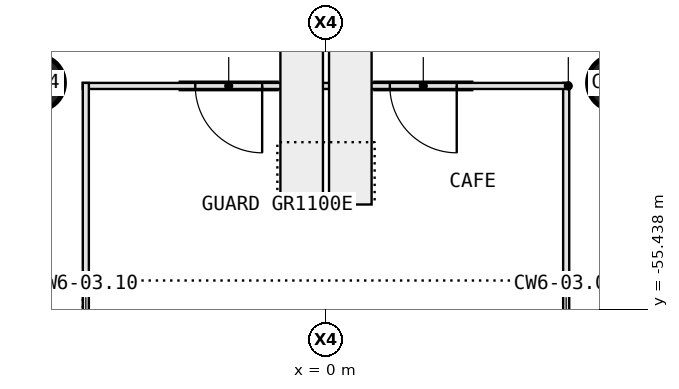
"""IFC4 building model, lengths in metres.
Left out: names, types, materials, properties, quantities, classifications, styles, units other than length and angle.
Written with IfcOpenShell. Run it as: python <this file> out.ifc"""

import sys

from ifc_helpers import new_model, si_unit, direction, frame, frame_2d, origin, origin_2d, place, context, subcontext, project, spatial, rectangle, circle, extrude, element, fill, save


model = new_model("IFC4")
c1 = context("Model", 3, precision=1e-05, world=origin(), true_north=direction((0.0, 1.0)))
c2 = subcontext(c1, "Body", "Model", "MODEL_VIEW")
j1 = project(units=[si_unit("LENGTHUNIT", "METRE"), si_unit("PLANEANGLEUNIT", "RADIAN")], contexts=[c1])
p1 = place(None, origin())
s1 = spatial("IfcSite", under=j1, at=p1, CompositionType="ELEMENT")
p2 = place(p1, origin())
s2 = spatial("IfcBuilding", under=s1, at=p2, CompositionType="ELEMENT")
p3 = place(p2, origin())
s3 = spatial("IfcBuildingStorey", under=s2, at=p3, CompositionType="ELEMENT", Elevation=0.0)
for number, where, z_axis, x_axis in (
    (1, (-9.5, -48.0, 0.0), (0.0, 0.0, 1.0), (1.0, 0.0, 0.0)),
    (2, (9.5, -48.0, 0.0), (0.0, 0.0, 1.0), (1.0, 0.0, 0.0)),
):
    element("IfcColumn", number, at=place(p3, frame(where, z_axis=z_axis, x_axis=x_axis)), inside=s3, PredefinedType="COLUMN", context=c2, shape_type="SweptSolid", body=[
        extrude(circle(Radius=0.9, at=origin_2d()), origin(), (0.0, 0.0, 1.0), 9.0),
    ])
p4 = place(p3, frame((4.77, -48.1, 0.0), z_axis=(0.0, 0.0, 1.0), x_axis=(-1.0, 0.0, 0.0)))
e3 = element("IfcWall", 3, at=p4, inside=s3, PredefinedType="SOLIDWALL", context=c2, shape_type="SweptSolid", body=[
    extrude(rectangle(XDim=3.14, YDim=0.2, at=frame_2d((1.57, 0.0))), origin(), (0.0, 0.0, 1.0), 2.7),
])
p5 = place(p4, frame((0.47, 0.0, 0.0)))
e4 = element("IfcOpeningElement", 4, at=p5, cuts=e3, PredefinedType="OPENING", context=c2, shape_type="SweptSolid", body=[
    extrude(rectangle(XDim=2.2, YDim=2.4, at=frame_2d((1.1, 1.2))), frame((0.0, 0.11, 0.0), z_axis=(0.0, -1.0, 0.0), x_axis=(1.0, 0.0, 0.0)), (0.0, 0.0, 1.0), 0.22),
])
p6 = place(p3, frame((-1.63, -48.1, 0.0), z_axis=(0.0, 0.0, 1.0), x_axis=(-1.0, 0.0, 0.0)))
e5 = element("IfcWall", 5, at=p6, inside=s3, PredefinedType="SOLIDWALL", context=c2, shape_type="SweptSolid", body=[
    extrude(rectangle(XDim=3.14, YDim=0.2, at=frame_2d((1.57, 0.0))), origin(), (0.0, 0.0, 1.0), 2.7),
])
p7 = place(p6, frame((0.47, 0.0, 0.0)))
e6 = element("IfcOpeningElement", 6, at=p7, cuts=e5, PredefinedType="OPENING", context=c2, shape_type="SweptSolid", body=[
    extrude(rectangle(XDim=2.2, YDim=2.4, at=frame_2d((1.1, 1.2))), frame((0.0, 0.11, 0.0), z_axis=(0.0, -1.0, 0.0), x_axis=(1.0, 0.0, 0.0)), (0.0, 0.0, 1.0), 0.22),
])
p8 = place(p5, origin())
e7 = element("IfcDoor", 7, at=p8, inside=s3, OperationType="DOUBLE_DOOR_DOUBLE_SWING", PredefinedType="DOOR", context=c2, shape_type="SweptSolid", body=[
    extrude(rectangle(XDim=2.2, YDim=2.4, at=frame_2d((1.1, 1.2))), frame((0.0, 0.025, 0.0), z_axis=(0.0, -1.0, 0.0), x_axis=(1.0, 0.0, 0.0)), (0.0, 0.0, 1.0), 0.05),
])
fill(e4, e7)
p9 = place(p7, origin())
e8 = element("IfcDoor", 8, at=p9, inside=s3, OperationType="DOUBLE_DOOR_DOUBLE_SWING", PredefinedType="DOOR", context=c2, shape_type="SweptSolid", body=[
    extrude(rectangle(XDim=2.2, YDim=2.4, at=frame_2d((1.1, 1.2))), frame((0.0, 0.025, 0.0), z_axis=(0.0, -1.0, 0.0), x_axis=(1.0, 0.0, 0.0)), (0.0, 0.0, 1.0), 0.05),
])
fill(e6, e8)
save(model, sys.argv[1])
